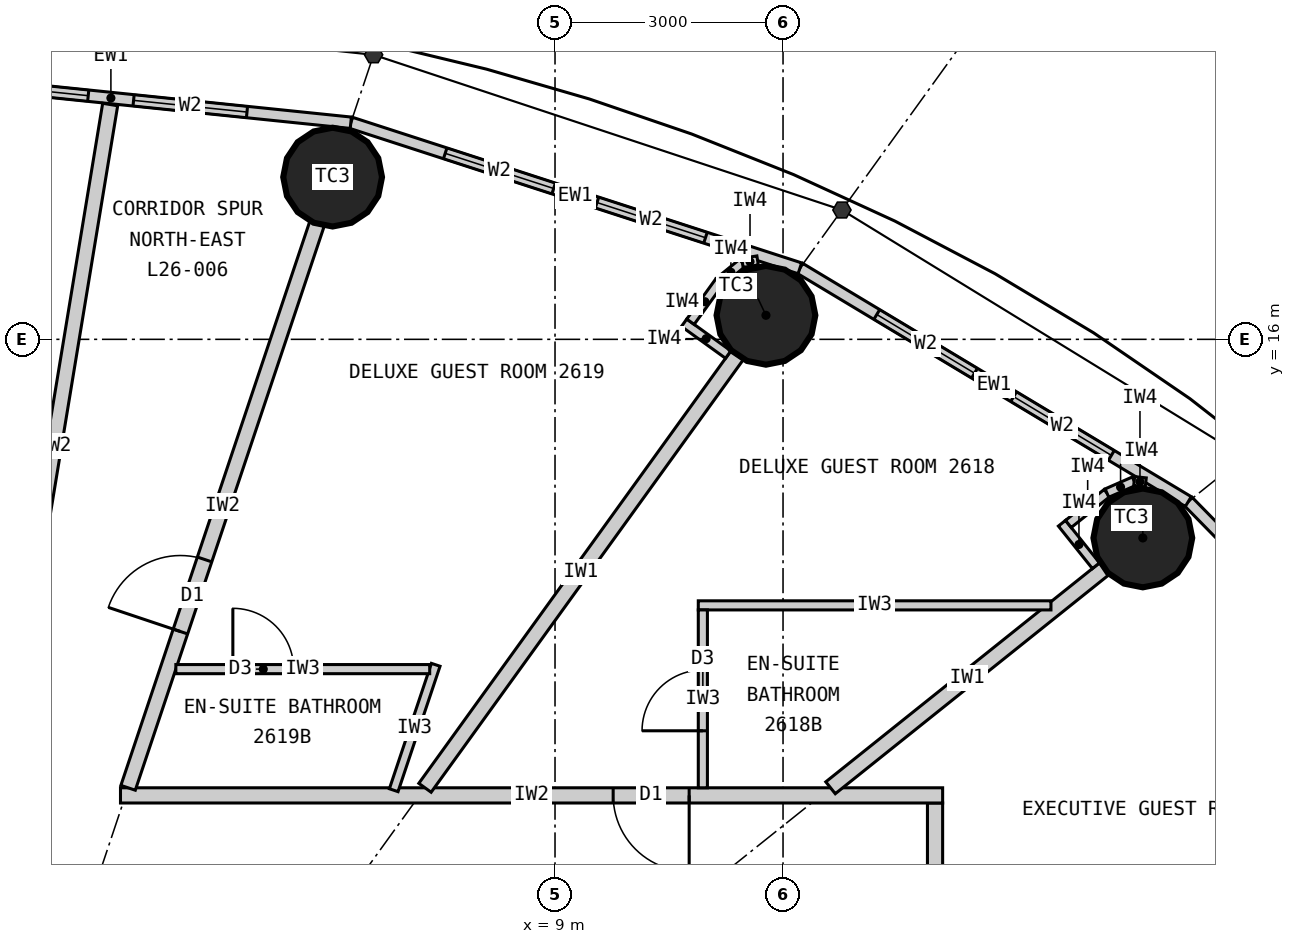
"""IFC4 building model, lengths in metres.
Left out: names, types, materials, properties, quantities, classifications, styles, units other than length and angle.
Written with IfcOpenShell. Run it as: python <this file> out.ifc"""

import sys

from ifc_helpers import new_model, si_unit, direction, frame, frame_2d, origin, origin_2d, place, context, subcontext, project, spatial, rectangle, circle, extrude, element, fill, save


model = new_model("IFC4")
c1 = context("Model", 3, precision=1e-05, world=origin(), true_north=direction((0.0, 1.0)))
c2 = subcontext(c1, "Body", "Model", "MODEL_VIEW")
j1 = project(units=[si_unit("LENGTHUNIT", "METRE"), si_unit("PLANEANGLEUNIT", "RADIAN")], contexts=[c1])
p1 = place(None, origin())
s1 = spatial("IfcSite", under=j1, at=p1, CompositionType="ELEMENT")
p2 = place(p1, origin())
s2 = spatial("IfcBuilding", under=s1, at=p2, CompositionType="ELEMENT")
p3 = place(p2, frame((0.0, 0.0, 105.6)))
s3 = spatial("IfcBuildingStorey", under=s2, at=p3, CompositionType="ELEMENT", Elevation=105.6)
for number, where, z_axis, x_axis in (
    (1, (16.734, 13.387, 0.0), (0.0, 0.0, 1.0), (1.0, 0.0, 0.0)),
    (2, (11.775, 16.316, 0.0), (0.0, 0.0, 1.0), (1.0, 0.0, 0.0)),
    (3, (6.074, 18.135, 0.0), (0.0, 0.0, 1.0), (1.0, 0.0, 0.0)),
):
    element("IfcColumn", number, at=place(p3, frame(where, z_axis=z_axis, x_axis=x_axis)), inside=s3, PredefinedType="COLUMN", context=c2, shape_type="SweptSolid", body=[
        extrude(circle(Radius=0.65, at=origin_2d()), origin(), (0.0, 0.0, 1.0), 3.3),
    ])
p4 = place(p3, frame((21.287, 9.832, 0.0), z_axis=(0.0, 0.0, 1.0), x_axis=(-0.700136650834, 0.714008872605, 0.0)))
e4 = element("IfcWall", 4, at=p4, inside=s3, PredefinedType="ELEMENTEDWALL", context=c2, shape_type="SweptSolid", body=[
    extrude(rectangle(XDim=5.649, YDim=0.15, at=frame_2d((2.825, 0.0))), origin(), (0.0, 0.0, 1.0), 3.12),
])
p5 = place(p4, frame((1.025, 0.0, 0.9)))
e5 = element("IfcOpeningElement", 5, at=p5, cuts=e4, PredefinedType="OPENING", context=c2, shape_type="SweptSolid", body=[
    extrude(rectangle(XDim=1.5, YDim=1.9, at=frame_2d((0.75, 0.95))), frame((0.0, 0.085, 0.0), z_axis=(0.0, -1.0, 0.0), x_axis=(1.0, 0.0, 0.0)), (0.0, 0.0, 1.0), 0.17),
])
p6 = place(p4, frame((3.125, 0.0, 0.9)))
e6 = element("IfcOpeningElement", 6, at=p6, cuts=e4, PredefinedType="OPENING", context=c2, shape_type="SweptSolid", body=[
    extrude(rectangle(XDim=1.5, YDim=1.9, at=frame_2d((0.75, 0.95))), frame((0.0, 0.085, 0.0), z_axis=(0.0, -1.0, 0.0), x_axis=(1.0, 0.0, 0.0)), (0.0, 0.0, 1.0), 0.17),
])
p7 = place(p3, frame((17.332, 13.866, 0.0), z_axis=(0.0, 0.0, 1.0), x_axis=(-0.857308573723, 0.514802884044, 0.0)))
e7 = element("IfcWall", 7, at=p7, inside=s3, PredefinedType="ELEMENTEDWALL", context=c2, shape_type="SweptSolid", body=[
    extrude(rectangle(XDim=5.961, YDim=0.15, at=frame_2d((2.98, 0.0))), origin(), (0.0, 0.0, 1.0), 3.12),
])
p8 = place(p7, frame((1.181, 0.0, 0.9)))
e8 = element("IfcOpeningElement", 8, at=p8, cuts=e7, PredefinedType="OPENING", context=c2, shape_type="SweptSolid", body=[
    extrude(rectangle(XDim=1.5, YDim=1.9, at=frame_2d((0.75, 0.95))), frame((0.0, 0.085, 0.0), z_axis=(0.0, -1.0, 0.0), x_axis=(1.0, 0.0, 0.0)), (0.0, 0.0, 1.0), 0.17),
])
p9 = place(p7, frame((3.281, 0.0, 0.9)))
e9 = element("IfcOpeningElement", 9, at=p9, cuts=e7, PredefinedType="OPENING", context=c2, shape_type="SweptSolid", body=[
    extrude(rectangle(XDim=1.5, YDim=1.9, at=frame_2d((0.75, 0.95))), frame((0.0, 0.085, 0.0), z_axis=(0.0, -1.0, 0.0), x_axis=(1.0, 0.0, 0.0)), (0.0, 0.0, 1.0), 0.17),
])
p10 = place(p3, frame((12.221, 16.935, 0.0), z_axis=(0.0, 0.0, 1.0), x_axis=(-0.951272691506, 0.308350881944, 0.0)))
e10 = element("IfcWall", 10, at=p10, inside=s3, PredefinedType="ELEMENTEDWALL", context=c2, shape_type="SweptSolid", body=[
    extrude(rectangle(XDim=6.211, YDim=0.15, at=frame_2d((3.105, 0.0))), origin(), (0.0, 0.0, 1.0), 3.12),
])
p11 = place(p10, frame((1.305, 0.0, 0.9)))
e11 = element("IfcOpeningElement", 11, at=p11, cuts=e10, PredefinedType="OPENING", context=c2, shape_type="SweptSolid", body=[
    extrude(rectangle(XDim=1.5, YDim=1.9, at=frame_2d((0.75, 0.95))), frame((0.0, 0.085, 0.0), z_axis=(0.0, -1.0, 0.0), x_axis=(1.0, 0.0, 0.0)), (0.0, 0.0, 1.0), 0.17),
])
p12 = place(p10, frame((3.405, 0.0, 0.9)))
e12 = element("IfcOpeningElement", 12, at=p12, cuts=e10, PredefinedType="OPENING", context=c2, shape_type="SweptSolid", body=[
    extrude(rectangle(XDim=1.5, YDim=1.9, at=frame_2d((0.75, 0.95))), frame((0.0, 0.085, 0.0), z_axis=(0.0, -1.0, 0.0), x_axis=(1.0, 0.0, 0.0)), (0.0, 0.0, 1.0), 0.17),
])
p13 = place(p3, frame((6.313, 18.85, 0.0), z_axis=(0.0, 0.0, 1.0), x_axis=(-0.994735690163, 0.102473931887, 0.0)))
e13 = element("IfcWall", 13, at=p13, inside=s3, PredefinedType="ELEMENTEDWALL", context=c2, shape_type="SweptSolid", body=[
    extrude(rectangle(XDim=6.347, YDim=0.15, at=frame_2d((3.173, 0.0))), origin(), (0.0, 0.0, 1.0), 3.12),
])
p14 = place(p13, frame((1.373, 0.0, 0.9)))
e14 = element("IfcOpeningElement", 14, at=p14, cuts=e13, PredefinedType="OPENING", context=c2, shape_type="SweptSolid", body=[
    extrude(rectangle(XDim=1.5, YDim=1.9, at=frame_2d((0.75, 0.95))), frame((0.0, 0.085, 0.0), z_axis=(0.0, -1.0, 0.0), x_axis=(1.0, 0.0, 0.0)), (0.0, 0.0, 1.0), 0.17),
])
p15 = place(p13, frame((3.473, 0.0, 0.9)))
e15 = element("IfcOpeningElement", 15, at=p15, cuts=e13, PredefinedType="OPENING", context=c2, shape_type="SweptSolid", body=[
    extrude(rectangle(XDim=1.5, YDim=1.9, at=frame_2d((0.75, 0.95))), frame((0.0, 0.085, 0.0), z_axis=(0.0, -1.0, 0.0), x_axis=(1.0, 0.0, 0.0)), (0.0, 0.0, 1.0), 0.17),
])
p16 = place(p3, frame((14.0, -9.9, 0.0), z_axis=(0.0, 0.0, 1.0), x_axis=(0.0, 1.0, 0.0)))
e16 = element("IfcWall", 16, at=p16, inside=s3, PredefinedType="PARTITIONING", context=c2, shape_type="SweptSolid", body=[
    extrude(rectangle(XDim=19.8, YDim=0.2, at=frame_2d((9.9, 0.0))), origin(), (0.0, 0.0, 1.0), 3.12),
])
p17 = place(p16, frame((3.62, 0.0, 0.0)))
e17 = element("IfcOpeningElement", 17, at=p17, cuts=e16, PredefinedType="OPENING", context=c2, shape_type="SweptSolid", body=[
    extrude(rectangle(XDim=1.6, YDim=2.4, at=frame_2d((0.8, 1.2))), frame((0.0, 0.11, 0.0), z_axis=(0.0, -1.0, 0.0), x_axis=(1.0, 0.0, 0.0)), (0.0, 0.0, 1.0), 0.22),
])
p18 = place(p16, frame((12.26, 0.0, 0.0)))
e18 = element("IfcOpeningElement", 18, at=p18, cuts=e16, PredefinedType="OPENING", context=c2, shape_type="SweptSolid", body=[
    extrude(rectangle(XDim=1.0, YDim=2.2, at=frame_2d((0.5, 1.1))), frame((0.0, 0.11, 0.0), z_axis=(0.0, -1.0, 0.0), x_axis=(1.0, 0.0, 0.0)), (0.0, 0.0, 1.0), 0.22),
])
p19 = place(p16, frame((17.777, 0.0, 0.0)))
e19 = element("IfcOpeningElement", 19, at=p19, cuts=e16, PredefinedType="OPENING", context=c2, shape_type="SweptSolid", body=[
    extrude(rectangle(XDim=1.0, YDim=2.2, at=frame_2d((0.5, 1.1))), frame((0.0, 0.11, 0.0), z_axis=(0.0, -1.0, 0.0), x_axis=(1.0, 0.0, 0.0)), (0.0, 0.0, 1.0), 0.22),
])
p20 = place(p3, frame((3.283, 10.0, 0.0), z_axis=(0.0, 0.0, 1.0), x_axis=(1.0, 0.0, 0.0)))
e20 = element("IfcWall", 20, at=p20, inside=s3, PredefinedType="PARTITIONING", context=c2, shape_type="SweptSolid", body=[
    extrude(rectangle(XDim=10.817, YDim=0.2, at=frame_2d((5.409, 0.0))), origin(), (0.0, 0.0, 1.0), 3.12),
])
p21 = place(p20, frame((6.482, 0.0, 0.0)))
e21 = element("IfcOpeningElement", 21, at=p21, cuts=e20, PredefinedType="OPENING", context=c2, shape_type="SweptSolid", body=[
    extrude(rectangle(XDim=1.0, YDim=2.2, at=frame_2d((0.5, 1.1))), frame((0.0, 0.11, 0.0), z_axis=(0.0, -1.0, 0.0), x_axis=(1.0, 0.0, 0.0)), (0.0, 0.0, 1.0), 0.22),
])
p22 = place(p3, frame((12.625, 10.1, 0.0), z_axis=(0.0, 0.0, 1.0), x_axis=(0.780863644897, 0.624701503182, 0.0)))
e22 = element("IfcWall", 22, at=p22, inside=s3, PredefinedType="PARTITIONING", context=c2, shape_type="SweptSolid", body=[
    extrude(rectangle(XDim=4.612, YDim=0.2, at=frame_2d((2.306, 0.0))), origin(), (0.0, 0.0, 1.0), 2.27),
])
p23 = place(p3, frame((7.289, 10.1, 0.0), z_axis=(0.0, 0.0, 1.0), x_axis=(0.585217367024, 0.81087645997, 0.0)))
e23 = element("IfcWall", 23, at=p23, inside=s3, PredefinedType="PARTITIONING", context=c2, shape_type="SweptSolid", body=[
    extrude(rectangle(XDim=7.016, YDim=0.2, at=frame_2d((3.508, 0.0))), origin(), (0.0, 0.0, 1.0), 2.27),
])
p24 = place(p3, frame((3.383, 10.1, 0.0), z_axis=(0.0, 0.0, 1.0), x_axis=(0.317603705574, 0.948223542318, 0.0)))
e24 = element("IfcWall", 24, at=p24, inside=s3, PredefinedType="PARTITIONING", context=c2, shape_type="SweptSolid", body=[
    extrude(rectangle(XDim=7.823, YDim=0.2, at=frame_2d((3.912, 0.0))), origin(), (0.0, 0.0, 1.0), 2.27),
])
p25 = place(p24, frame((2.168, 0.0, 0.0)))
e25 = element("IfcOpeningElement", 25, at=p25, cuts=e24, PredefinedType="OPENING", context=c2, shape_type="SweptSolid", body=[
    extrude(rectangle(XDim=1.0, YDim=2.2, at=frame_2d((0.5, 1.1))), frame((0.0, 0.11, 0.0), z_axis=(0.0, -1.0, 0.0), x_axis=(1.0, 0.0, 0.0)), (0.0, 0.0, 1.0), 0.22),
])
p26 = place(p3, frame((1.665, 10.1, 0.0), z_axis=(0.0, 0.0, 1.0), x_axis=(0.162660519103, 0.986682094459, 0.0)))
e26 = element("IfcWall", 26, at=p26, inside=s3, PredefinedType="PARTITIONING", context=c2, shape_type="SweptSolid", body=[
    extrude(rectangle(XDim=9.111, YDim=0.2, at=frame_2d((4.555, 0.0))), origin(), (0.0, 0.0, 1.0), 3.12),
])
p27 = place(p26, frame((1.86, 0.0, 0.0)))
e27 = element("IfcOpeningElement", 27, at=p27, cuts=e26, PredefinedType="OPENING", context=c2, shape_type="SweptSolid", body=[
    extrude(rectangle(XDim=1.0, YDim=2.2, at=frame_2d((0.5, 1.1))), frame((0.0, 0.11, 0.0), z_axis=(0.0, -1.0, 0.0), x_axis=(1.0, 0.0, 0.0)), (0.0, 0.0, 1.0), 0.22),
])
p28 = place(p3, frame((15.525, 12.5, 0.0), z_axis=(0.0, 0.0, 1.0), x_axis=(-1.0, 0.0, 0.0)))
e28 = element("IfcWall", 28, at=p28, inside=s3, PredefinedType="PARTITIONING", context=c2, shape_type="SweptSolid", body=[
    extrude(rectangle(XDim=4.64, YDim=0.12, at=frame_2d((2.32, 0.0))), origin(), (0.0, 0.0, 1.0), 3.12),
])
p29 = place(p3, frame((10.945, 10.1, 0.0), z_axis=(0.0, 0.0, 1.0), x_axis=(0.0, 1.0, 0.0)))
e29 = element("IfcWall", 29, at=p29, inside=s3, PredefinedType="PARTITIONING", context=c2, shape_type="SweptSolid", body=[
    extrude(rectangle(XDim=2.34, YDim=0.12, at=frame_2d((1.17, 0.0))), origin(), (0.0, 0.0, 1.0), 3.12),
])
p30 = place(p29, frame((0.75, 0.0, 0.0)))
e30 = element("IfcOpeningElement", 30, at=p30, cuts=e29, PredefinedType="OPENING", context=c2, shape_type="SweptSolid", body=[
    extrude(rectangle(XDim=0.8, YDim=2.1, at=frame_2d((0.4, 1.05))), frame((0.0, 0.07, 0.0), z_axis=(0.0, -1.0, 0.0), x_axis=(1.0, 0.0, 0.0)), (0.0, 0.0, 1.0), 0.14),
])
p31 = place(p3, frame((6.878, 10.068, 0.0), z_axis=(0.0, 0.0, 1.0), x_axis=(0.317532394508, 0.948247424694, 0.0)))
e31 = element("IfcWall", 31, at=p31, inside=s3, PredefinedType="PARTITIONING", context=c2, shape_type="SweptSolid", body=[
    extrude(rectangle(XDim=1.74, YDim=0.12, at=frame_2d((0.87, 0.0))), origin(), (0.0, 0.0, 1.0), 3.12),
])
p32 = place(p3, frame((4.011, 11.661, 0.0), z_axis=(0.0, 0.0, 1.0), x_axis=(1.0, 0.0, 0.0)))
e32 = element("IfcWall", 32, at=p32, inside=s3, PredefinedType="PARTITIONING", context=c2, shape_type="SweptSolid", body=[
    extrude(rectangle(XDim=3.34, YDim=0.12, at=frame_2d((1.67, 0.0))), origin(), (0.0, 0.0, 1.0), 3.12),
])
p33 = place(p32, frame((0.75, 0.0, 0.0)))
e33 = element("IfcOpeningElement", 33, at=p33, cuts=e32, PredefinedType="OPENING", context=c2, shape_type="SweptSolid", body=[
    extrude(rectangle(XDim=0.8, YDim=2.1, at=frame_2d((0.4, 1.05))), frame((0.0, 0.07, 0.0), z_axis=(0.0, -1.0, 0.0), x_axis=(1.0, 0.0, 0.0)), (0.0, 0.0, 1.0), 0.14),
])
p34 = place(p3, frame((16.117, 13.022, 0.0), z_axis=(0.0, 0.0, 1.0), x_axis=(-0.62465344249, 0.780902091677, 0.0)))
e34 = element("IfcWall", 34, at=p34, inside=s3, PredefinedType="PARTITIONING", context=c2, shape_type="SweptSolid", body=[
    extrude(rectangle(XDim=0.716, YDim=0.12, at=frame_2d((0.358, 0.0))), origin(), (0.0, 0.0, 1.0), 3.12),
])
p35 = place(p3, frame((15.754, 13.571, 0.0), z_axis=(0.0, 0.0, 1.0), x_axis=(0.780905453553, 0.624649239663, 0.0)))
e35 = element("IfcWall", 35, at=p35, inside=s3, PredefinedType="PARTITIONING", context=c2, shape_type="SweptSolid", body=[
    extrude(rectangle(XDim=0.65, YDim=0.12, at=frame_2d((0.325, 0.0))), origin(), (0.0, 0.0, 1.0), 3.12),
])
p36 = place(p3, frame((16.262, 13.977, 0.0), z_axis=(0.0, 0.0, 1.0), x_axis=(0.915985403703, 0.401211590314, 0.0)))
e36 = element("IfcWall", 36, at=p36, inside=s3, PredefinedType="PARTITIONING", context=c2, shape_type="SweptSolid", body=[
    extrude(rectangle(XDim=0.391, YDim=0.12, at=frame_2d((0.196, 0.0))), origin(), (0.0, 0.0, 1.0), 3.12),
])
p37 = place(p3, frame((16.62, 14.134, 0.0), z_axis=(0.0, 0.0, 1.0), x_axis=(0.993941871493, -0.109907033867, 0.0)))
e37 = element("IfcWall", 37, at=p37, inside=s3, PredefinedType="PARTITIONING", context=c2, shape_type="SweptSolid", body=[
    extrude(rectangle(XDim=0.153, YDim=0.12, at=frame_2d((0.077, 0.0))), origin(), (0.0, 0.0, 1.0), 3.12),
])
p38 = place(p3, frame((11.279, 15.799, 0.0), z_axis=(0.0, 0.0, 1.0), x_axis=(-0.810912957127, 0.585166793285, 0.0)))
e38 = element("IfcWall", 38, at=p38, inside=s3, PredefinedType="PARTITIONING", context=c2, shape_type="SweptSolid", body=[
    extrude(rectangle(XDim=0.716, YDim=0.12, at=frame_2d((0.358, 0.0))), origin(), (0.0, 0.0, 1.0), 3.12),
])
p39 = place(p3, frame((10.782, 16.231, 0.0), z_axis=(0.0, 0.0, 1.0), x_axis=(0.585175102182, 0.810906961239, 0.0)))
e39 = element("IfcWall", 39, at=p39, inside=s3, PredefinedType="PARTITIONING", context=c2, shape_type="SweptSolid", body=[
    extrude(rectangle(XDim=0.65, YDim=0.12, at=frame_2d((0.325, 0.0))), origin(), (0.0, 0.0, 1.0), 3.12),
])
p40 = place(p3, frame((11.162, 16.759, 0.0), z_axis=(0.0, 0.0, 1.0), x_axis=(0.775178428527, 0.63174235567, 0.0)))
e40 = element("IfcWall", 40, at=p40, inside=s3, PredefinedType="PARTITIONING", context=c2, shape_type="SweptSolid", body=[
    extrude(rectangle(XDim=0.392, YDim=0.12, at=frame_2d((0.196, 0.0))), origin(), (0.0, 0.0, 1.0), 3.12),
])
p41 = place(p3, frame((11.466, 17.006, 0.0), z_axis=(0.0, 0.0, 1.0), x_axis=(0.987228877621, 0.15930832744, 0.0)))
e41 = element("IfcWall", 41, at=p41, inside=s3, PredefinedType="PARTITIONING", context=c2, shape_type="SweptSolid", body=[
    extrude(rectangle(XDim=0.202, YDim=0.12, at=frame_2d((0.101, 0.0))), origin(), (0.0, 0.0, 1.0), 3.12),
])
p42 = place(p8, origin())
e42 = element("IfcWindow", 42, at=p42, inside=s3, PartitioningType="SINGLE_PANEL", PredefinedType="WINDOW", context=c2, shape_type="SweptSolid", body=[
    extrude(rectangle(XDim=1.5, YDim=1.9, at=frame_2d((0.75, 0.95))), frame((0.0, 0.03, 0.0), z_axis=(0.0, -1.0, 0.0), x_axis=(1.0, 0.0, 0.0)), (0.0, 0.0, 1.0), 0.06),
])
fill(e8, e42)
p43 = place(p9, origin())
e43 = element("IfcWindow", 43, at=p43, inside=s3, PartitioningType="SINGLE_PANEL", PredefinedType="WINDOW", context=c2, shape_type="SweptSolid", body=[
    extrude(rectangle(XDim=1.5, YDim=1.9, at=frame_2d((0.75, 0.95))), frame((0.0, 0.03, 0.0), z_axis=(0.0, -1.0, 0.0), x_axis=(1.0, 0.0, 0.0)), (0.0, 0.0, 1.0), 0.06),
])
fill(e9, e43)
p44 = place(p11, origin())
e44 = element("IfcWindow", 44, at=p44, inside=s3, PartitioningType="SINGLE_PANEL", PredefinedType="WINDOW", context=c2, shape_type="SweptSolid", body=[
    extrude(rectangle(XDim=1.5, YDim=1.9, at=frame_2d((0.75, 0.95))), frame((0.0, 0.03, 0.0), z_axis=(0.0, -1.0, 0.0), x_axis=(1.0, 0.0, 0.0)), (0.0, 0.0, 1.0), 0.06),
])
fill(e11, e44)
p45 = place(p12, origin())
e45 = element("IfcWindow", 45, at=p45, inside=s3, PartitioningType="SINGLE_PANEL", PredefinedType="WINDOW", context=c2, shape_type="SweptSolid", body=[
    extrude(rectangle(XDim=1.5, YDim=1.9, at=frame_2d((0.75, 0.95))), frame((0.0, 0.03, 0.0), z_axis=(0.0, -1.0, 0.0), x_axis=(1.0, 0.0, 0.0)), (0.0, 0.0, 1.0), 0.06),
])
fill(e12, e45)
p46 = place(p14, origin())
e46 = element("IfcWindow", 46, at=p46, inside=s3, PartitioningType="SINGLE_PANEL", PredefinedType="WINDOW", context=c2, shape_type="SweptSolid", body=[
    extrude(rectangle(XDim=1.5, YDim=1.9, at=frame_2d((0.75, 0.95))), frame((0.0, 0.03, 0.0), z_axis=(0.0, -1.0, 0.0), x_axis=(1.0, 0.0, 0.0)), (0.0, 0.0, 1.0), 0.06),
])
fill(e14, e46)
p47 = place(p15, origin())
e47 = element("IfcWindow", 47, at=p47, inside=s3, PartitioningType="SINGLE_PANEL", PredefinedType="WINDOW", context=c2, shape_type="SweptSolid", body=[
    extrude(rectangle(XDim=1.5, YDim=1.9, at=frame_2d((0.75, 0.95))), frame((0.0, 0.03, 0.0), z_axis=(0.0, -1.0, 0.0), x_axis=(1.0, 0.0, 0.0)), (0.0, 0.0, 1.0), 0.06),
])
fill(e15, e47)
p48 = place(p30, origin())
e48 = element("IfcDoor", 48, at=p48, inside=s3, OperationType="SINGLE_SWING_LEFT", PredefinedType="DOOR", context=c2, shape_type="SweptSolid", body=[
    extrude(rectangle(XDim=0.8, YDim=2.1, at=frame_2d((0.4, 1.05))), frame((0.0, 0.025, 0.0), z_axis=(0.0, -1.0, 0.0), x_axis=(1.0, 0.0, 0.0)), (0.0, 0.0, 1.0), 0.05),
])
fill(e30, e48)
p49 = place(p21, origin())
e49 = element("IfcDoor", 49, at=p49, inside=s3, OperationType="SINGLE_SWING_RIGHT", PredefinedType="DOOR", context=c2, shape_type="SweptSolid", body=[
    extrude(rectangle(XDim=1.0, YDim=2.2, at=frame_2d((0.5, 1.1))), frame((0.0, 0.025, 0.0), z_axis=(0.0, -1.0, 0.0), x_axis=(1.0, 0.0, 0.0)), (0.0, 0.0, 1.0), 0.05),
])
fill(e21, e49)
p50 = place(p33, origin())
e50 = element("IfcDoor", 50, at=p50, inside=s3, OperationType="SINGLE_SWING_LEFT", PredefinedType="DOOR", context=c2, shape_type="SweptSolid", body=[
    extrude(rectangle(XDim=0.8, YDim=2.1, at=frame_2d((0.4, 1.05))), frame((0.0, 0.025, 0.0), z_axis=(0.0, -1.0, 0.0), x_axis=(1.0, 0.0, 0.0)), (0.0, 0.0, 1.0), 0.05),
])
fill(e33, e50)
p51 = place(p25, origin())
e51 = element("IfcDoor", 51, at=p51, inside=s3, OperationType="SINGLE_SWING_LEFT", PredefinedType="DOOR", context=c2, shape_type="SweptSolid", body=[
    extrude(rectangle(XDim=1.0, YDim=2.2, at=frame_2d((0.5, 1.1))), frame((0.0, 0.025, 0.0), z_axis=(0.0, -1.0, 0.0), x_axis=(1.0, 0.0, 0.0)), (0.0, 0.0, 1.0), 0.05),
])
fill(e25, e51)
save(model, sys.argv[1])
